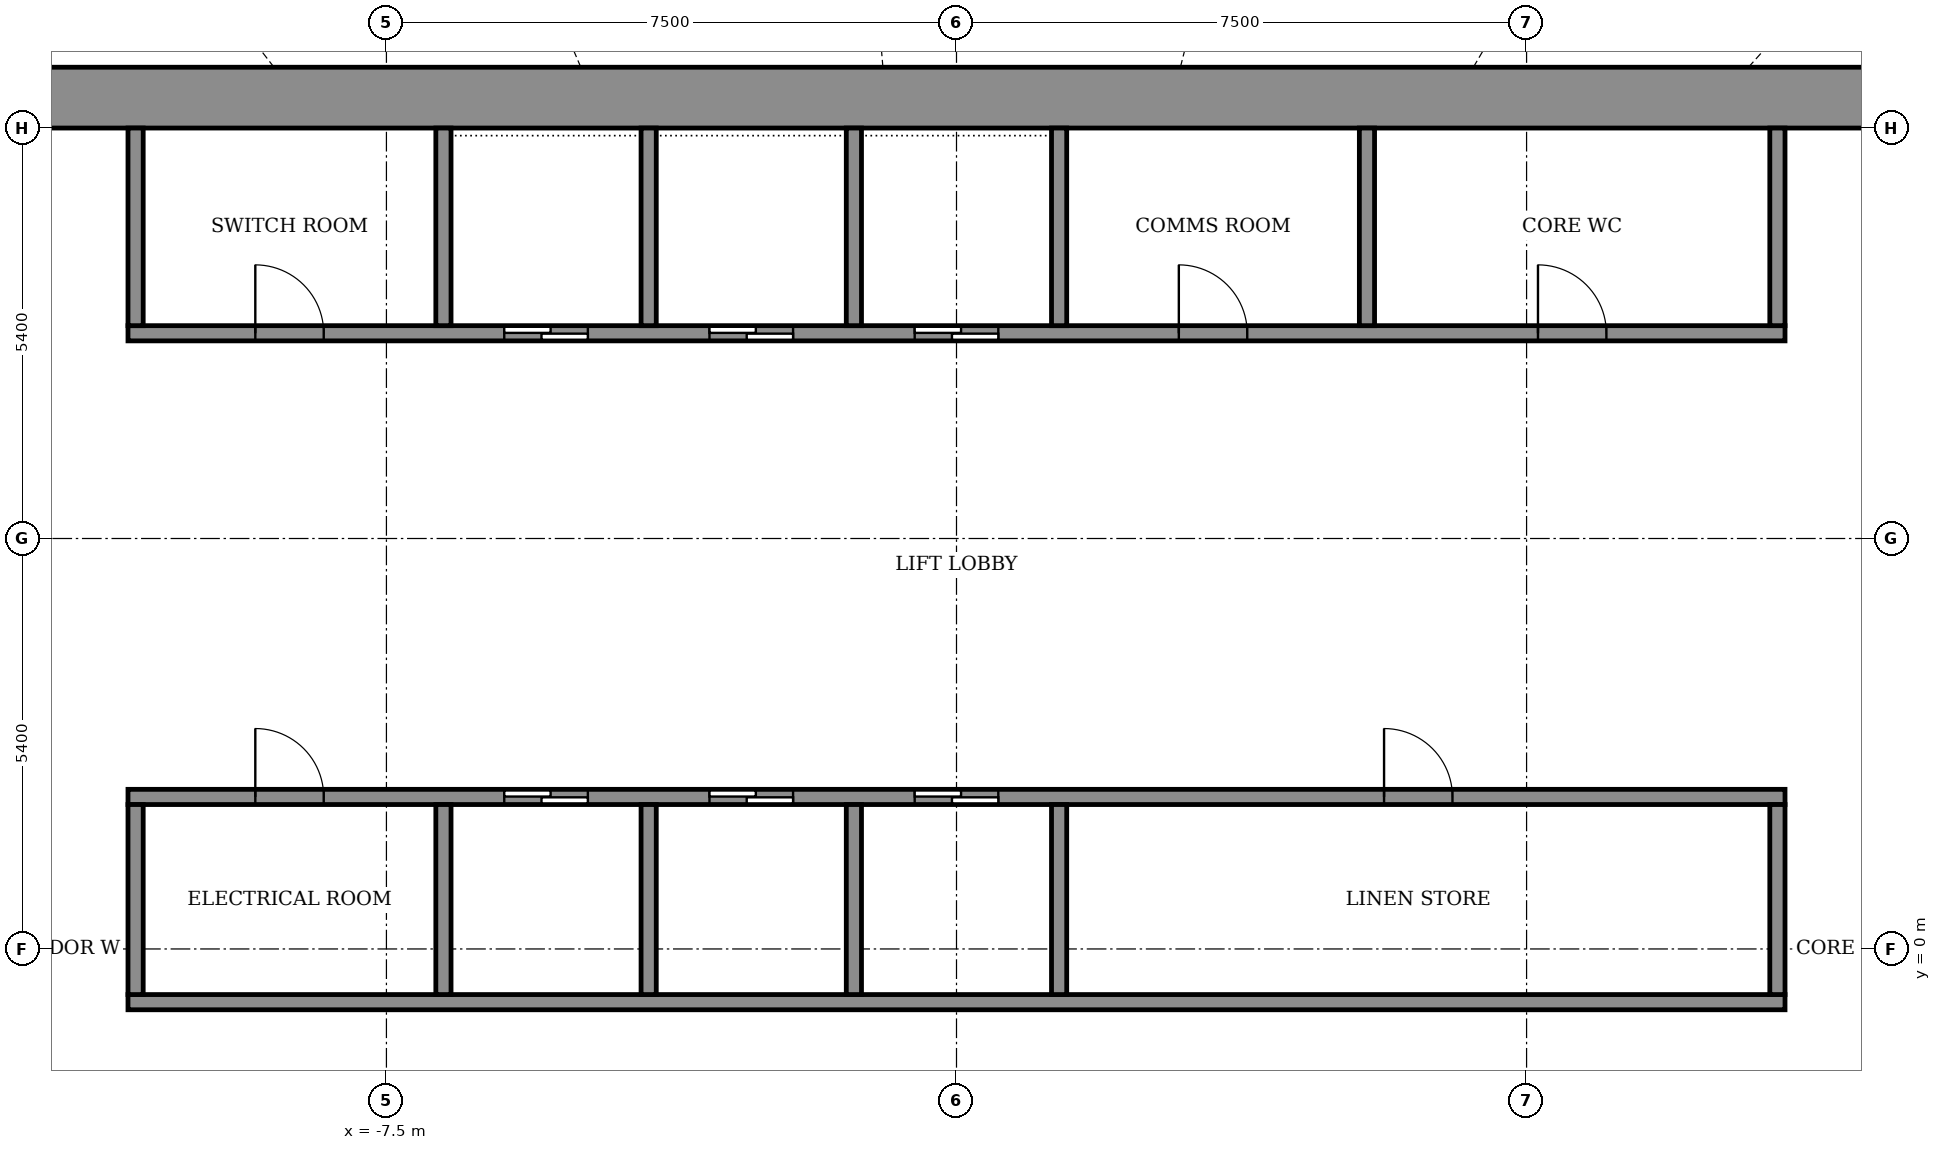
"""IFC4 building model, lengths in metres.
Left out: names, types, materials, properties, quantities, classifications, styles, units other than length and angle.
Written with IfcOpenShell. Run it as: python <this file> out.ifc"""

import sys

from ifc_helpers import new_model, si_unit, direction, frame, frame_2d, origin, place, context, subcontext, project, spatial, rectangle, extrude, element, fill, save


model = new_model("IFC4")
c1 = context("Model", 3, precision=1e-05, world=origin(), true_north=direction((0.0, 1.0)))
c2 = subcontext(c1, "Body", "Model", "MODEL_VIEW")
j1 = project(units=[si_unit("LENGTHUNIT", "METRE"), si_unit("PLANEANGLEUNIT", "RADIAN")], contexts=[c1])
p1 = place(None, origin())
s1 = spatial("IfcSite", under=j1, at=p1, CompositionType="ELEMENT")
p2 = place(p1, origin())
s2 = spatial("IfcBuilding", under=s1, at=p2, CompositionType="ELEMENT")
p3 = place(p2, frame((0.0, 0.0, 226.5)))
s3 = spatial("IfcBuildingStorey", under=s2, at=p3, CompositionType="ELEMENT", Elevation=226.5)
p4 = place(p3, frame((-14.6, 11.2, 0.0), z_axis=(0.0, 0.0, 1.0), x_axis=(1.0, 0.0, 0.0)))
e1 = element("IfcWall", 1, at=p4, inside=s3, PredefinedType="SHEAR", context=c2, shape_type="SweptSolid", body=[
    extrude(rectangle(XDim=29.2, YDim=0.8, at=frame_2d((14.6, 0.0))), origin(), (0.0, 0.0, 1.0), 4.6),
])
p5 = place(p3, frame((-10.9, -0.7, 0.0), z_axis=(0.0, 0.0, 1.0), x_axis=(1.0, 0.0, 0.0)))
e2 = element("IfcWall", 2, at=p5, inside=s3, PredefinedType="SHEAR", context=c2, shape_type="SweptSolid", body=[
    extrude(rectangle(XDim=21.8, YDim=0.2, at=frame_2d((10.9, 0.0))), origin(), (0.0, 0.0, 1.0), 4.05),
])
p6 = place(p3, frame((-10.9, 2.0, 0.0), z_axis=(0.0, 0.0, 1.0), x_axis=(1.0, 0.0, 0.0)))
e3 = element("IfcWall", 3, at=p6, inside=s3, PredefinedType="SHEAR", context=c2, shape_type="SweptSolid", body=[
    extrude(rectangle(XDim=21.8, YDim=0.2, at=frame_2d((10.9, 0.0))), origin(), (0.0, 0.0, 1.0), 4.05),
])
p7 = place(p6, frame((4.95, 0.0, 0.0)))
e4 = element("IfcOpeningElement", 4, at=p7, cuts=e3, PredefinedType="OPENING", context=c2, shape_type="SweptSolid", body=[
    extrude(rectangle(XDim=1.1, YDim=2.1, at=frame_2d((0.55, 1.05))), frame((0.0, 0.11, 0.0), z_axis=(0.0, -1.0, 0.0), x_axis=(1.0, 0.0, 0.0)), (0.0, 0.0, 1.0), 0.22),
])
p8 = place(p6, frame((7.65, 0.0, 0.0)))
e5 = element("IfcOpeningElement", 5, at=p8, cuts=e3, PredefinedType="OPENING", context=c2, shape_type="SweptSolid", body=[
    extrude(rectangle(XDim=1.1, YDim=2.1, at=frame_2d((0.55, 1.05))), frame((0.0, 0.11, 0.0), z_axis=(0.0, -1.0, 0.0), x_axis=(1.0, 0.0, 0.0)), (0.0, 0.0, 1.0), 0.22),
])
p9 = place(p6, frame((10.35, 0.0, 0.0)))
e6 = element("IfcOpeningElement", 6, at=p9, cuts=e3, PredefinedType="OPENING", context=c2, shape_type="SweptSolid", body=[
    extrude(rectangle(XDim=1.1, YDim=2.1, at=frame_2d((0.55, 1.05))), frame((0.0, 0.11, 0.0), z_axis=(0.0, -1.0, 0.0), x_axis=(1.0, 0.0, 0.0)), (0.0, 0.0, 1.0), 0.22),
])
p10 = place(p6, frame((1.675, 0.0, 0.0)))
e7 = element("IfcOpeningElement", 7, at=p10, cuts=e3, PredefinedType="OPENING", context=c2, shape_type="SweptSolid", body=[
    extrude(rectangle(XDim=0.9, YDim=2.1, at=frame_2d((0.45, 1.05))), frame((0.0, 0.11, 0.0), z_axis=(0.0, -1.0, 0.0), x_axis=(1.0, 0.0, 0.0)), (0.0, 0.0, 1.0), 0.22),
])
p11 = place(p6, frame((16.525, 0.0, 0.0)))
e8 = element("IfcOpeningElement", 8, at=p11, cuts=e3, PredefinedType="OPENING", context=c2, shape_type="SweptSolid", body=[
    extrude(rectangle(XDim=0.9, YDim=2.1, at=frame_2d((0.45, 1.05))), frame((0.0, 0.11, 0.0), z_axis=(0.0, -1.0, 0.0), x_axis=(1.0, 0.0, 0.0)), (0.0, 0.0, 1.0), 0.22),
])
p12 = place(p3, frame((-10.9, 8.1, 0.0), z_axis=(0.0, 0.0, 1.0), x_axis=(1.0, 0.0, 0.0)))
e9 = element("IfcWall", 9, at=p12, inside=s3, PredefinedType="SHEAR", context=c2, shape_type="SweptSolid", body=[
    extrude(rectangle(XDim=21.8, YDim=0.2, at=frame_2d((10.9, 0.0))), origin(), (0.0, 0.0, 1.0), 4.05),
])
p13 = place(p12, frame((4.95, 0.0, 0.0)))
e10 = element("IfcOpeningElement", 10, at=p13, cuts=e9, PredefinedType="OPENING", context=c2, shape_type="SweptSolid", body=[
    extrude(rectangle(XDim=1.1, YDim=2.1, at=frame_2d((0.55, 1.05))), frame((0.0, 0.11, 0.0), z_axis=(0.0, -1.0, 0.0), x_axis=(1.0, 0.0, 0.0)), (0.0, 0.0, 1.0), 0.22),
])
p14 = place(p12, frame((7.65, 0.0, 0.0)))
e11 = element("IfcOpeningElement", 11, at=p14, cuts=e9, PredefinedType="OPENING", context=c2, shape_type="SweptSolid", body=[
    extrude(rectangle(XDim=1.1, YDim=2.1, at=frame_2d((0.55, 1.05))), frame((0.0, 0.11, 0.0), z_axis=(0.0, -1.0, 0.0), x_axis=(1.0, 0.0, 0.0)), (0.0, 0.0, 1.0), 0.22),
])
p15 = place(p12, frame((10.35, 0.0, 0.0)))
e12 = element("IfcOpeningElement", 12, at=p15, cuts=e9, PredefinedType="OPENING", context=c2, shape_type="SweptSolid", body=[
    extrude(rectangle(XDim=1.1, YDim=2.1, at=frame_2d((0.55, 1.05))), frame((0.0, 0.11, 0.0), z_axis=(0.0, -1.0, 0.0), x_axis=(1.0, 0.0, 0.0)), (0.0, 0.0, 1.0), 0.22),
])
p16 = place(p12, frame((1.675, 0.0, 0.0)))
e13 = element("IfcOpeningElement", 13, at=p16, cuts=e9, PredefinedType="OPENING", context=c2, shape_type="SweptSolid", body=[
    extrude(rectangle(XDim=0.9, YDim=2.1, at=frame_2d((0.45, 1.05))), frame((0.0, 0.11, 0.0), z_axis=(0.0, -1.0, 0.0), x_axis=(1.0, 0.0, 0.0)), (0.0, 0.0, 1.0), 0.22),
])
p17 = place(p12, frame((13.825, 0.0, 0.0)))
e14 = element("IfcOpeningElement", 14, at=p17, cuts=e9, PredefinedType="OPENING", context=c2, shape_type="SweptSolid", body=[
    extrude(rectangle(XDim=0.9, YDim=2.1, at=frame_2d((0.45, 1.05))), frame((0.0, 0.11, 0.0), z_axis=(0.0, -1.0, 0.0), x_axis=(1.0, 0.0, 0.0)), (0.0, 0.0, 1.0), 0.22),
])
p18 = place(p12, frame((18.55, 0.0, 0.0)))
e15 = element("IfcOpeningElement", 15, at=p18, cuts=e9, PredefinedType="OPENING", context=c2, shape_type="SweptSolid", body=[
    extrude(rectangle(XDim=0.9, YDim=2.1, at=frame_2d((0.45, 1.05))), frame((0.0, 0.11, 0.0), z_axis=(0.0, -1.0, 0.0), x_axis=(1.0, 0.0, 0.0)), (0.0, 0.0, 1.0), 0.22),
])
p19 = place(p3, frame((-10.8, -0.6, 0.0), z_axis=(0.0, 0.0, 1.0), x_axis=(0.0, 1.0, 0.0)))
e16 = element("IfcWall", 16, at=p19, inside=s3, PredefinedType="STANDARD", context=c2, shape_type="SweptSolid", body=[
    extrude(rectangle(XDim=2.5, YDim=0.2, at=frame_2d((1.25, 0.0))), origin(), (0.0, 0.0, 1.0), 4.05),
])
for number, where, z_axis, x_axis in (
    (17, (-6.75, -0.6, 0.0), (0.0, 0.0, 1.0), (0.0, 1.0, 0.0)),
    (18, (-4.05, -0.6, 0.0), (0.0, 0.0, 1.0), (0.0, 1.0, 0.0)),
    (19, (-1.35, -0.6, 0.0), (0.0, 0.0, 1.0), (0.0, 1.0, 0.0)),
    (20, (1.35, -0.6, 0.0), (0.0, 0.0, 1.0), (0.0, 1.0, 0.0)),
):
    element("IfcWall", number, at=place(p3, frame(where, z_axis=z_axis, x_axis=x_axis)), inside=s3, PredefinedType="SHEAR", context=c2, shape_type="SweptSolid", body=[
        extrude(rectangle(XDim=2.5, YDim=0.2, at=frame_2d((1.25, 0.0))), origin(), (0.0, 0.0, 1.0), 4.05),
    ])
p20 = place(p3, frame((10.8, -0.6, 0.0), z_axis=(0.0, 0.0, 1.0), x_axis=(0.0, 1.0, 0.0)))
e21 = element("IfcWall", 21, at=p20, inside=s3, PredefinedType="STANDARD", context=c2, shape_type="SweptSolid", body=[
    extrude(rectangle(XDim=2.5, YDim=0.2, at=frame_2d((1.25, 0.0))), origin(), (0.0, 0.0, 1.0), 4.05),
])
p21 = place(p3, frame((-10.8, 8.2, 0.0), z_axis=(0.0, 0.0, 1.0), x_axis=(0.0, 1.0, 0.0)))
e22 = element("IfcWall", 22, at=p21, inside=s3, PredefinedType="STANDARD", context=c2, shape_type="SweptSolid", body=[
    extrude(rectangle(XDim=2.6, YDim=0.2, at=frame_2d((1.3, 0.0))), origin(), (0.0, 0.0, 1.0), 4.05),
])
for number, where, z_axis, x_axis in (
    (23, (-6.75, 8.2, 0.0), (0.0, 0.0, 1.0), (0.0, 1.0, 0.0)),
    (24, (-4.05, 8.2, 0.0), (0.0, 0.0, 1.0), (0.0, 1.0, 0.0)),
    (25, (-1.35, 8.2, 0.0), (0.0, 0.0, 1.0), (0.0, 1.0, 0.0)),
    (26, (1.35, 8.2, 0.0), (0.0, 0.0, 1.0), (0.0, 1.0, 0.0)),
):
    element("IfcWall", number, at=place(p3, frame(where, z_axis=z_axis, x_axis=x_axis)), inside=s3, PredefinedType="SHEAR", context=c2, shape_type="SweptSolid", body=[
        extrude(rectangle(XDim=2.6, YDim=0.2, at=frame_2d((1.3, 0.0))), origin(), (0.0, 0.0, 1.0), 4.05),
    ])
for number, where, z_axis, x_axis in (
    (27, (5.4, 8.2, 0.0), (0.0, 0.0, 1.0), (0.0, 1.0, 0.0)),
    (28, (10.8, 8.2, 0.0), (0.0, 0.0, 1.0), (0.0, 1.0, 0.0)),
):
    element("IfcWall", number, at=place(p3, frame(where, z_axis=z_axis, x_axis=x_axis)), inside=s3, PredefinedType="STANDARD", context=c2, shape_type="SweptSolid", body=[
        extrude(rectangle(XDim=2.6, YDim=0.2, at=frame_2d((1.3, 0.0))), origin(), (0.0, 0.0, 1.0), 4.05),
    ])
p22 = place(p7, origin())
e29 = element("IfcDoor", 29, at=p22, inside=s3, OperationType="SLIDING_TO_LEFT", PredefinedType="DOOR", context=c2, shape_type="SweptSolid", body=[
    extrude(rectangle(XDim=1.1, YDim=2.1, at=frame_2d((0.55, 1.05))), frame((0.0, 0.025, 0.0), z_axis=(0.0, -1.0, 0.0), x_axis=(1.0, 0.0, 0.0)), (0.0, 0.0, 1.0), 0.05),
])
fill(e4, e29)
p23 = place(p8, origin())
e30 = element("IfcDoor", 30, at=p23, inside=s3, OperationType="SLIDING_TO_LEFT", PredefinedType="DOOR", context=c2, shape_type="SweptSolid", body=[
    extrude(rectangle(XDim=1.1, YDim=2.1, at=frame_2d((0.55, 1.05))), frame((0.0, 0.025, 0.0), z_axis=(0.0, -1.0, 0.0), x_axis=(1.0, 0.0, 0.0)), (0.0, 0.0, 1.0), 0.05),
])
fill(e5, e30)
p24 = place(p9, origin())
e31 = element("IfcDoor", 31, at=p24, inside=s3, OperationType="SLIDING_TO_LEFT", PredefinedType="DOOR", context=c2, shape_type="SweptSolid", body=[
    extrude(rectangle(XDim=1.1, YDim=2.1, at=frame_2d((0.55, 1.05))), frame((0.0, 0.025, 0.0), z_axis=(0.0, -1.0, 0.0), x_axis=(1.0, 0.0, 0.0)), (0.0, 0.0, 1.0), 0.05),
])
fill(e6, e31)
p25 = place(p13, origin())
e32 = element("IfcDoor", 32, at=p25, inside=s3, OperationType="SLIDING_TO_LEFT", PredefinedType="DOOR", context=c2, shape_type="SweptSolid", body=[
    extrude(rectangle(XDim=1.1, YDim=2.1, at=frame_2d((0.55, 1.05))), frame((0.0, 0.025, 0.0), z_axis=(0.0, -1.0, 0.0), x_axis=(1.0, 0.0, 0.0)), (0.0, 0.0, 1.0), 0.05),
])
fill(e10, e32)
p26 = place(p14, origin())
e33 = element("IfcDoor", 33, at=p26, inside=s3, OperationType="SLIDING_TO_LEFT", PredefinedType="DOOR", context=c2, shape_type="SweptSolid", body=[
    extrude(rectangle(XDim=1.1, YDim=2.1, at=frame_2d((0.55, 1.05))), frame((0.0, 0.025, 0.0), z_axis=(0.0, -1.0, 0.0), x_axis=(1.0, 0.0, 0.0)), (0.0, 0.0, 1.0), 0.05),
])
fill(e11, e33)
p27 = place(p15, origin())
e34 = element("IfcDoor", 34, at=p27, inside=s3, OperationType="SLIDING_TO_LEFT", PredefinedType="DOOR", context=c2, shape_type="SweptSolid", body=[
    extrude(rectangle(XDim=1.1, YDim=2.1, at=frame_2d((0.55, 1.05))), frame((0.0, 0.025, 0.0), z_axis=(0.0, -1.0, 0.0), x_axis=(1.0, 0.0, 0.0)), (0.0, 0.0, 1.0), 0.05),
])
fill(e12, e34)
p28 = place(p10, origin())
e35 = element("IfcDoor", 35, at=p28, inside=s3, OperationType="SINGLE_SWING_LEFT", PredefinedType="DOOR", context=c2, shape_type="SweptSolid", body=[
    extrude(rectangle(XDim=0.9, YDim=2.1, at=frame_2d((0.45, 1.05))), frame((0.0, 0.025, 0.0), z_axis=(0.0, -1.0, 0.0), x_axis=(1.0, 0.0, 0.0)), (0.0, 0.0, 1.0), 0.05),
])
fill(e7, e35)
p29 = place(p11, origin())
e36 = element("IfcDoor", 36, at=p29, inside=s3, OperationType="SINGLE_SWING_RIGHT", PredefinedType="DOOR", context=c2, shape_type="SweptSolid", body=[
    extrude(rectangle(XDim=0.9, YDim=2.1, at=frame_2d((0.45, 1.05))), frame((0.0, 0.025, 0.0), z_axis=(0.0, -1.0, 0.0), x_axis=(1.0, 0.0, 0.0)), (0.0, 0.0, 1.0), 0.05),
])
fill(e8, e36)
p30 = place(p16, origin())
e37 = element("IfcDoor", 37, at=p30, inside=s3, OperationType="SINGLE_SWING_LEFT", PredefinedType="DOOR", context=c2, shape_type="SweptSolid", body=[
    extrude(rectangle(XDim=0.9, YDim=2.1, at=frame_2d((0.45, 1.05))), frame((0.0, 0.025, 0.0), z_axis=(0.0, -1.0, 0.0), x_axis=(1.0, 0.0, 0.0)), (0.0, 0.0, 1.0), 0.05),
])
fill(e13, e37)
p31 = place(p17, origin())
e38 = element("IfcDoor", 38, at=p31, inside=s3, OperationType="SINGLE_SWING_LEFT", PredefinedType="DOOR", context=c2, shape_type="SweptSolid", body=[
    extrude(rectangle(XDim=0.9, YDim=2.1, at=frame_2d((0.45, 1.05))), frame((0.0, 0.025, 0.0), z_axis=(0.0, -1.0, 0.0), x_axis=(1.0, 0.0, 0.0)), (0.0, 0.0, 1.0), 0.05),
])
fill(e14, e38)
p32 = place(p18, origin())
e39 = element("IfcDoor", 39, at=p32, inside=s3, OperationType="SINGLE_SWING_RIGHT", PredefinedType="DOOR", context=c2, shape_type="SweptSolid", body=[
    extrude(rectangle(XDim=0.9, YDim=2.1, at=frame_2d((0.45, 1.05))), frame((0.0, 0.025, 0.0), z_axis=(0.0, -1.0, 0.0), x_axis=(1.0, 0.0, 0.0)), (0.0, 0.0, 1.0), 0.05),
])
fill(e15, e39)
save(model, sys.argv[1])
